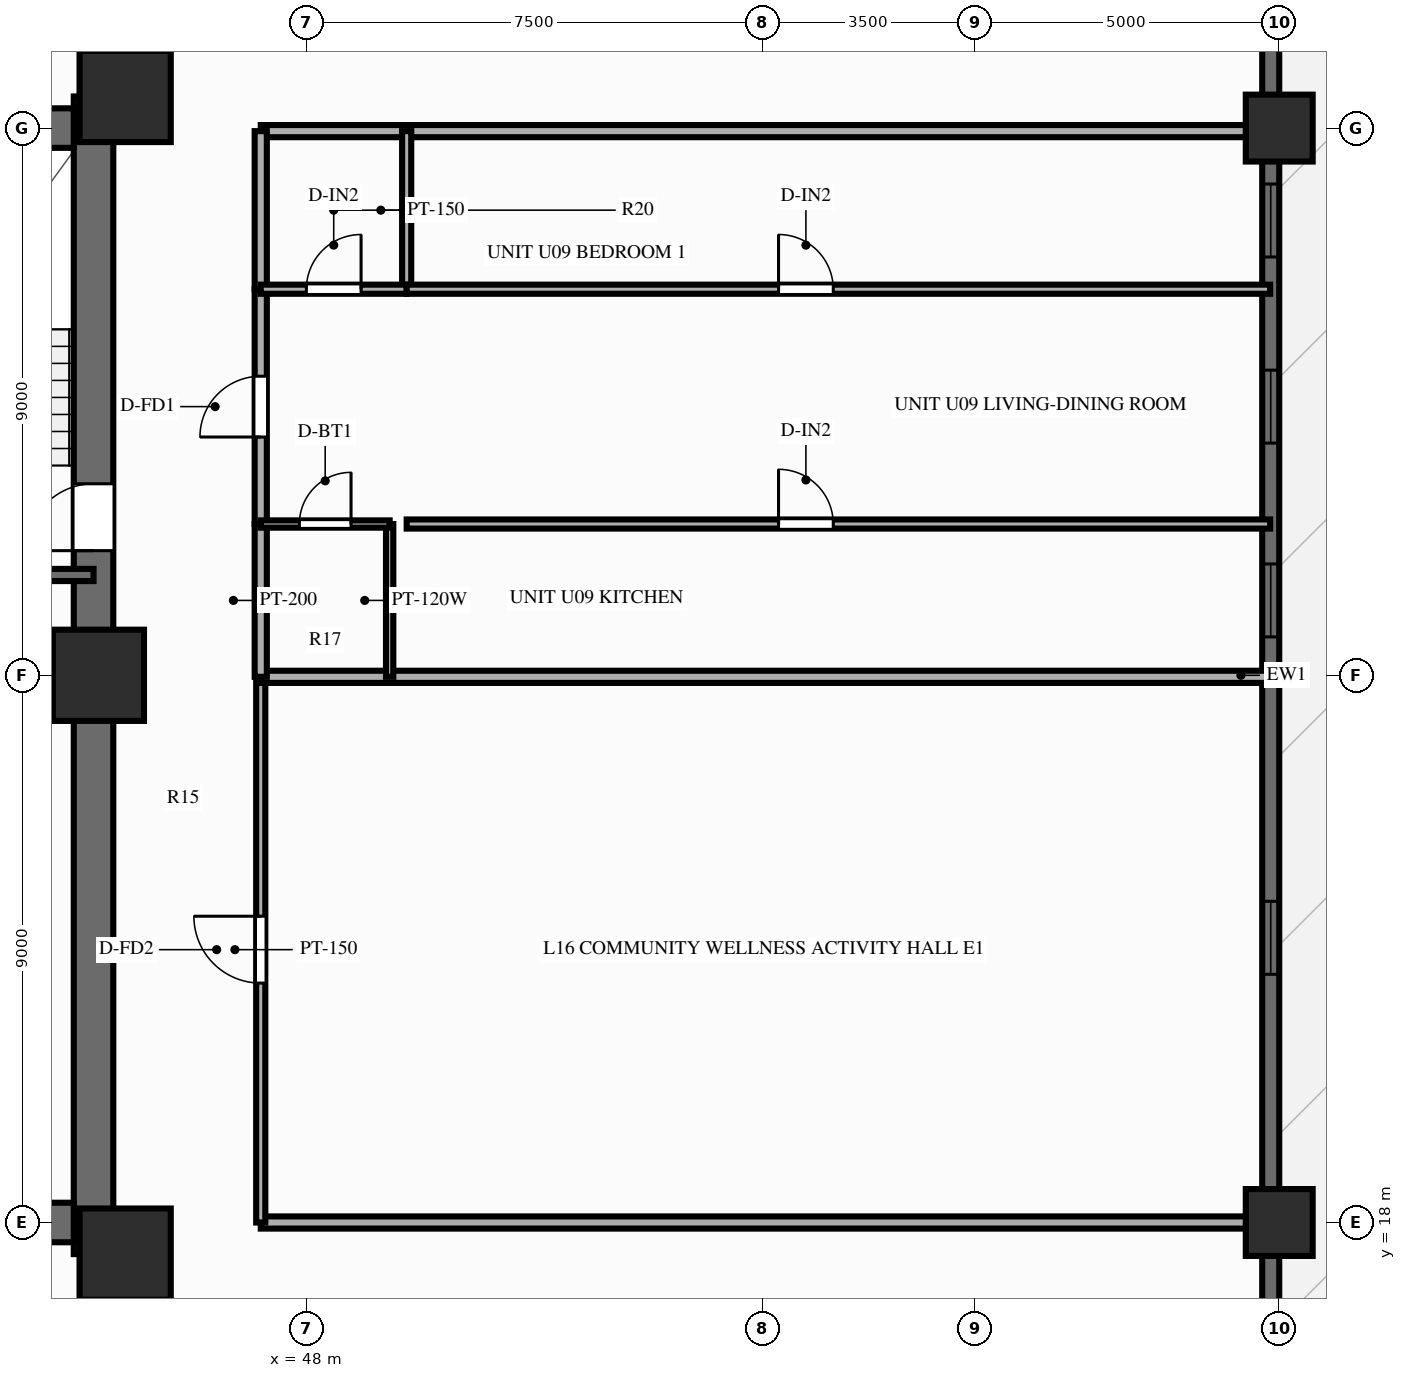
"""IFC4 building model, lengths in metres.
Left out: names, types, materials, properties, quantities, classifications, styles, units other than length and angle.
Written with IfcOpenShell. Run it as: python <this file> out.ifc"""

import sys

from ifc_helpers import new_model, si_unit, direction, frame, frame_2d, origin, origin_2d, place, context, subcontext, project, spatial, rectangle, extrude, source, transform, mapped, element, fill, save


model = new_model("IFC4")
c1 = context("Model", 3, precision=1e-05, world=origin(), true_north=direction((0.0, 1.0)))
c2 = subcontext(c1, "Body", "Model", "MODEL_VIEW")
j1 = project(units=[si_unit("LENGTHUNIT", "METRE"), si_unit("PLANEANGLEUNIT", "RADIAN")], contexts=[c1])
p1 = place(None, origin())
s1 = spatial("IfcSite", under=j1, at=p1, CompositionType="ELEMENT")
p2 = place(p1, origin())
s2 = spatial("IfcBuilding", under=s1, at=p2, CompositionType="ELEMENT")
p3 = place(p2, frame((0.0, 0.0, 52.4)))
s3 = spatial("IfcBuildingStorey", under=s2, at=p3, CompositionType="ELEMENT", Elevation=52.4)
p4 = place(p3, frame((44.5, 17.48, 0.0), z_axis=(0.0, 0.0, 1.0), x_axis=(0.0, 1.0, 0.0)))
e1 = element("IfcWall", 1, at=p4, inside=s3, PredefinedType="SHEAR", context=c2, shape_type="SweptSolid", body=[
    extrude(rectangle(XDim=19.04, YDim=0.65, at=frame_2d((9.52, 0.0))), origin(), (0.0, 0.0, 1.0), 3.0),
])
p5 = place(p4, frame((12.67, 0.0, 0.0), z_axis=(0.0, 0.0, 1.0), x_axis=(-1.0, 0.0, 0.0)))
e2 = element("IfcOpeningElement", 2, at=p5, cuts=e1, PredefinedType="OPENING", context=c2, shape_type="SweptSolid", body=[
    extrude(rectangle(XDim=1.1, YDim=2.15, at=frame_2d((0.55, 1.075))), frame((0.0, 0.337, 0.0), z_axis=(0.0, -1.0, 0.0), x_axis=(1.0, 0.0, 0.0)), (0.0, 0.0, 1.0), 0.674),
])
p6 = place(p3, frame((31.825, 18.0, 0.0), z_axis=(0.0, 0.0, 1.0), x_axis=(1.0, 0.0, 0.0)))
e3 = element("IfcWall", 3, at=p6, inside=s3, PredefinedType="SHEAR", context=c2, shape_type="SweptSolid", body=[
    extrude(rectangle(XDim=12.35, YDim=0.65, at=frame_2d((6.175, 0.0))), origin(), (0.0, 0.0, 1.0), 3.0),
])
p7 = place(p3, frame((31.825, 36.0, 0.0), z_axis=(0.0, 0.0, 1.0), x_axis=(1.0, 0.0, 0.0)))
e4 = element("IfcWall", 4, at=p7, inside=s3, PredefinedType="SHEAR", context=c2, shape_type="SweptSolid", body=[
    extrude(rectangle(XDim=12.35, YDim=0.65, at=frame_2d((6.175, 0.0))), origin(), (0.0, 0.0, 1.0), 3.0),
])
p8 = place(p7, frame((5.125, 0.0, 0.0), z_axis=(0.0, 0.0, 1.0), x_axis=(-1.0, 0.0, 0.0)))
e5 = element("IfcOpeningElement", 5, at=p8, cuts=e4, PredefinedType="OPENING", context=c2, shape_type="SweptSolid", body=[
    extrude(rectangle(XDim=1.4, YDim=2.15, at=frame_2d((0.7, 1.075))), frame((0.0, 0.337, 0.0), z_axis=(0.0, -1.0, 0.0), x_axis=(1.0, 0.0, 0.0)), (0.0, 0.0, 1.0), 0.674),
])
m1 = source(origin(), c2, "Body", "SweptSolid", [
    extrude(rectangle(XDim=1.5, YDim=1.5, at=origin_2d()), origin(), (0.0, 0.0, 1.0), 3.0),
])
for number, where, z_axis, x_axis in (
    (6, (45.02, 17.48, 0.0), (0.0, 0.0, 1.0), (1.0, 0.0, 0.0)),
    (7, (45.02, 36.52, 0.0), (0.0, 0.0, 1.0), (1.0, 0.0, 0.0)),
    (8, (44.58, 27.0, 0.0), (0.0, 0.0, 1.0), (1.0, 0.0, 0.0)),
):
    element("IfcColumn", number, at=place(p3, frame(where, z_axis=z_axis, x_axis=x_axis)), inside=s3, PredefinedType="COLUMN", context=c2, shape_type="MappedRepresentation", body=[
        mapped(m1, transform((0.0, 0.0, 0.0), scale=1.0)),
    ])
m2 = source(origin(), c2, "Body", "SweptSolid", [
    extrude(rectangle(XDim=1.1, YDim=1.1, at=origin_2d()), origin(), (0.0, 0.0, 1.0), 3.0),
])
for number, where, z_axis, x_axis in (
    (9, (64.0, 18.0, 0.0), (0.0, 0.0, 1.0), (1.0, 0.0, 0.0)),
    (10, (64.0, 36.0, 0.0), (0.0, 0.0, 1.0), (1.0, 0.0, 0.0)),
):
    element("IfcColumn", number, at=place(p3, frame(where, z_axis=z_axis, x_axis=x_axis)), inside=s3, PredefinedType="COLUMN", context=c2, shape_type="MappedRepresentation", body=[
        mapped(m2, transform((0.0, 0.0, 0.0), scale=1.0)),
    ])
p9 = place(p3, frame((63.86, 6.5, 0.0), z_axis=(0.0, 0.0, 1.0), x_axis=(0.0, 1.0, 0.0)))
e11 = element("IfcWall", 11, at=p9, inside=s3, PredefinedType="SOLIDWALL", context=c2, shape_type="SweptSolid", body=[
    extrude(rectangle(XDim=41.0, YDim=0.28, at=frame_2d((20.5, 0.0))), origin(), (0.0, 0.0, 1.0), 2.28),
])
p10 = place(p9, frame((5.15, 0.0, 0.25)))
e12 = element("IfcOpeningElement", 12, at=p10, cuts=e11, PredefinedType="OPENING", context=c2, shape_type="SweptSolid", body=[
    extrude(rectangle(XDim=1.2, YDim=1.5, at=frame_2d((0.6, 0.75))), frame((0.0, 0.152, 0.0), z_axis=(0.0, -1.0, 0.0), x_axis=(1.0, 0.0, 0.0)), (0.0, 0.0, 1.0), 0.304),
])
p11 = place(p9, frame((15.583, 0.0, 0.25)))
e13 = element("IfcOpeningElement", 13, at=p11, cuts=e11, PredefinedType="OPENING", context=c2, shape_type="SweptSolid", body=[
    extrude(rectangle(XDim=1.2, YDim=1.5, at=frame_2d((0.6, 0.75))), frame((0.0, 0.152, 0.0), z_axis=(0.0, -1.0, 0.0), x_axis=(1.0, 0.0, 0.0)), (0.0, 0.0, 1.0), 0.304),
])
p12 = place(p9, frame((21.132, 0.0, 0.25)))
e14 = element("IfcOpeningElement", 14, at=p12, cuts=e11, PredefinedType="OPENING", context=c2, shape_type="SweptSolid", body=[
    extrude(rectangle(XDim=1.2, YDim=1.5, at=frame_2d((0.6, 0.75))), frame((0.0, 0.152, 0.0), z_axis=(0.0, -1.0, 0.0), x_axis=(1.0, 0.0, 0.0)), (0.0, 0.0, 1.0), 0.304),
])
p13 = place(p9, frame((24.319, 0.0, 0.25)))
e15 = element("IfcOpeningElement", 15, at=p13, cuts=e11, PredefinedType="OPENING", context=c2, shape_type="SweptSolid", body=[
    extrude(rectangle(XDim=1.2, YDim=1.5, at=frame_2d((0.6, 0.75))), frame((0.0, 0.152, 0.0), z_axis=(0.0, -1.0, 0.0), x_axis=(1.0, 0.0, 0.0)), (0.0, 0.0, 1.0), 0.304),
])
p14 = place(p9, frame((27.38, 0.0, 0.25)))
e16 = element("IfcOpeningElement", 16, at=p14, cuts=e11, PredefinedType="OPENING", context=c2, shape_type="SweptSolid", body=[
    extrude(rectangle(XDim=1.2, YDim=1.5, at=frame_2d((0.6, 0.75))), frame((0.0, 0.152, 0.0), z_axis=(0.0, -1.0, 0.0), x_axis=(1.0, 0.0, 0.0)), (0.0, 0.0, 1.0), 0.304),
])
p15 = place(p9, frame((36.05, 0.0, 0.0), z_axis=(0.0, 0.0, 1.0), x_axis=(-1.0, 0.0, 0.0)))
e17 = element("IfcOpeningElement", 17, at=p15, cuts=e11, PredefinedType="OPENING", context=c2, shape_type="SweptSolid", body=[
    extrude(rectangle(XDim=1.6, YDim=2.15, at=frame_2d((0.8, 1.075))), frame((0.0, 0.152, 0.0), z_axis=(0.0, -1.0, 0.0), x_axis=(1.0, 0.0, 0.0)), (0.0, 0.0, 1.0), 0.304),
])
p16 = place(p3, frame((40.57, 28.65, 0.0), z_axis=(0.0, 0.0, 1.0), x_axis=(1.0, 0.0, 0.0)))
e18 = element("IfcWall", 18, at=p16, inside=s3, PredefinedType="SOLIDWALL", context=c2, shape_type="SweptSolid", body=[
    extrude(rectangle(XDim=3.93, YDim=0.2, at=frame_2d((1.965, 0.0))), origin(), (0.0, 0.0, 1.0), 2.79),
])
for number, where, z_axis, x_axis in (
    (19, (47.25, 18.0, 0.0), (0.0, 0.0, 1.0), (1.0, 0.0, 0.0)),
    (20, (47.25, 35.95, 0.0), (0.0, 0.0, 1.0), (1.0, 0.0, 0.0)),
):
    element("IfcWall", number, at=place(p3, frame(where, z_axis=z_axis, x_axis=x_axis)), inside=s3, PredefinedType="PARTITIONING", context=c2, shape_type="SweptSolid", body=[
        extrude(rectangle(XDim=16.6, YDim=0.2, at=frame_2d((8.3, 0.0))), origin(), (0.0, 0.0, 1.0), 2.24),
    ])
p17 = place(p3, frame((47.25, 18.0, 0.0), z_axis=(0.0, 0.0, 1.0), x_axis=(0.0, 1.0, 0.0)))
e21 = element("IfcWall", 21, at=p17, inside=s3, PredefinedType="PARTITIONING", context=c2, shape_type="SweptSolid", body=[
    extrude(rectangle(XDim=8.975, YDim=0.15, at=frame_2d((4.488, 0.0))), origin(), (0.0, 0.0, 1.0), 2.79),
])
p18 = place(p17, frame((3.938, 0.0, 0.0)))
e22 = element("IfcOpeningElement", 22, at=p18, cuts=e21, PredefinedType="OPENING", context=c2, shape_type="SweptSolid", body=[
    extrude(rectangle(XDim=1.1, YDim=2.15, at=frame_2d((0.55, 1.075))), frame((0.0, 0.087, 0.0), z_axis=(0.0, -1.0, 0.0), x_axis=(1.0, 0.0, 0.0)), (0.0, 0.0, 1.0), 0.174),
])
p19 = place(p3, frame((47.25, 26.975, 0.0), z_axis=(0.0, 0.0, 1.0), x_axis=(1.0, 0.0, 0.0)))
e23 = element("IfcWall", 23, at=p19, inside=s3, PredefinedType="PARTITIONING", context=c2, shape_type="SweptSolid", body=[
    extrude(rectangle(XDim=16.6, YDim=0.2, at=frame_2d((8.3, 0.0))), origin(), (0.0, 0.0, 1.0), 2.79),
])
p20 = place(p3, frame((47.25, 26.975, 0.0), z_axis=(0.0, 0.0, 1.0), x_axis=(0.0, 1.0, 0.0)))
e24 = element("IfcWall", 24, at=p20, inside=s3, PredefinedType="PARTITIONING", context=c2, shape_type="SweptSolid", body=[
    extrude(rectangle(XDim=2.513, YDim=0.2, at=frame_2d((1.256, 0.0))), origin(), (0.0, 0.0, 1.0), 2.79),
])
p21 = place(p3, frame((47.25, 29.488, 0.0), z_axis=(0.0, 0.0, 1.0), x_axis=(0.0, 1.0, 0.0)))
e25 = element("IfcWall", 25, at=p21, inside=s3, PredefinedType="PARTITIONING", context=c2, shape_type="SweptSolid", body=[
    extrude(rectangle(XDim=3.862, YDim=0.2, at=frame_2d((1.931, 0.0))), origin(), (0.0, 0.0, 1.0), 2.79),
])
p22 = place(p21, frame((1.431, 0.0, 0.0)))
e26 = element("IfcOpeningElement", 26, at=p22, cuts=e25, PredefinedType="OPENING", context=c2, shape_type="SweptSolid", body=[
    extrude(rectangle(XDim=1.0, YDim=2.15, at=frame_2d((0.5, 1.075))), frame((0.0, 0.112, 0.0), z_axis=(0.0, -1.0, 0.0), x_axis=(1.0, 0.0, 0.0)), (0.0, 0.0, 1.0), 0.224),
])
p23 = place(p3, frame((47.25, 33.35, 0.0), z_axis=(0.0, 0.0, 1.0), x_axis=(0.0, 1.0, 0.0)))
e27 = element("IfcWall", 27, at=p23, inside=s3, PredefinedType="PARTITIONING", context=c2, shape_type="SweptSolid", body=[
    extrude(rectangle(XDim=2.6, YDim=0.2, at=frame_2d((1.3, 0.0))), origin(), (0.0, 0.0, 1.0), 2.79),
])
p24 = place(p3, frame((49.37, 26.975, 0.0), z_axis=(0.0, 0.0, 1.0), x_axis=(0.0, 1.0, 0.0)))
e28 = element("IfcWall", 28, at=p24, inside=s3, PredefinedType="PARTITIONING", context=c2, shape_type="SweptSolid", body=[
    extrude(rectangle(XDim=2.513, YDim=0.12, at=frame_2d((1.256, 0.0))), origin(), (0.0, 0.0, 1.0), 2.79),
])
p25 = place(p3, frame((49.65, 33.35, 0.0), z_axis=(0.0, 0.0, 1.0), x_axis=(0.0, 1.0, 0.0)))
e29 = element("IfcWall", 29, at=p25, inside=s3, PredefinedType="PARTITIONING", context=c2, shape_type="SweptSolid", body=[
    extrude(rectangle(XDim=2.6, YDim=0.15, at=frame_2d((1.3, 0.0))), origin(), (0.0, 0.0, 1.0), 2.79),
])
p26 = place(p3, frame((47.25, 29.488, 0.0), z_axis=(0.0, 0.0, 1.0), x_axis=(1.0, 0.0, 0.0)))
e30 = element("IfcWall", 30, at=p26, inside=s3, PredefinedType="PARTITIONING", context=c2, shape_type="SweptSolid", body=[
    extrude(rectangle(XDim=2.12, YDim=0.12, at=frame_2d((1.06, 0.0))), origin(), (0.0, 0.0, 1.0), 2.79),
])
p27 = place(p26, frame((0.635, 0.0, 0.0)))
e31 = element("IfcOpeningElement", 31, at=p27, cuts=e30, PredefinedType="OPENING", context=c2, shape_type="SweptSolid", body=[
    extrude(rectangle(XDim=0.85, YDim=2.05, at=frame_2d((0.425, 1.025))), frame((0.0, 0.072, 0.0), z_axis=(0.0, -1.0, 0.0), x_axis=(1.0, 0.0, 0.0)), (0.0, 0.0, 1.0), 0.144),
])
p28 = place(p3, frame((49.65, 29.488, 0.0), z_axis=(0.0, 0.0, 1.0), x_axis=(1.0, 0.0, 0.0)))
e32 = element("IfcWall", 32, at=p28, inside=s3, PredefinedType="PARTITIONING", context=c2, shape_type="SweptSolid", body=[
    extrude(rectangle(XDim=14.2, YDim=0.15, at=frame_2d((7.1, 0.0))), origin(), (0.0, 0.0, 1.0), 2.79),
])
p29 = place(p28, frame((6.116, 0.0, 0.0)))
e33 = element("IfcOpeningElement", 33, at=p29, cuts=e32, PredefinedType="OPENING", context=c2, shape_type="SweptSolid", body=[
    extrude(rectangle(XDim=0.9, YDim=2.1, at=frame_2d((0.45, 1.05))), frame((0.0, 0.087, 0.0), z_axis=(0.0, -1.0, 0.0), x_axis=(1.0, 0.0, 0.0)), (0.0, 0.0, 1.0), 0.174),
])
p30 = place(p3, frame((47.25, 33.35, 0.0), z_axis=(0.0, 0.0, 1.0), x_axis=(1.0, 0.0, 0.0)))
e34 = element("IfcWall", 34, at=p30, inside=s3, PredefinedType="PARTITIONING", context=c2, shape_type="SweptSolid", body=[
    extrude(rectangle(XDim=2.4, YDim=0.15, at=frame_2d((1.2, 0.0))), origin(), (0.0, 0.0, 1.0), 2.79),
])
p31 = place(p30, frame((0.75, 0.0, 0.0)))
e35 = element("IfcOpeningElement", 35, at=p31, cuts=e34, PredefinedType="OPENING", context=c2, shape_type="SweptSolid", body=[
    extrude(rectangle(XDim=0.9, YDim=2.1, at=frame_2d((0.45, 1.05))), frame((0.0, 0.087, 0.0), z_axis=(0.0, -1.0, 0.0), x_axis=(1.0, 0.0, 0.0)), (0.0, 0.0, 1.0), 0.174),
])
p32 = place(p3, frame((49.65, 33.35, 0.0), z_axis=(0.0, 0.0, 1.0), x_axis=(1.0, 0.0, 0.0)))
e36 = element("IfcWall", 36, at=p32, inside=s3, PredefinedType="PARTITIONING", context=c2, shape_type="SweptSolid", body=[
    extrude(rectangle(XDim=14.2, YDim=0.15, at=frame_2d((7.1, 0.0))), origin(), (0.0, 0.0, 1.0), 2.79),
])
p33 = place(p32, frame((6.116, 0.0, 0.0)))
e37 = element("IfcOpeningElement", 37, at=p33, cuts=e36, PredefinedType="OPENING", context=c2, shape_type="SweptSolid", body=[
    extrude(rectangle(XDim=0.9, YDim=2.1, at=frame_2d((0.45, 1.05))), frame((0.0, 0.087, 0.0), z_axis=(0.0, -1.0, 0.0), x_axis=(1.0, 0.0, 0.0)), (0.0, 0.0, 1.0), 0.174),
])
m3 = source(origin(), c2, "Body", "SweptSolid", [
    extrude(rectangle(XDim=1.2, YDim=1.5, at=frame_2d((0.6, 0.75))), frame((0.0, 0.03, 0.0), z_axis=(0.0, -1.0, 0.0), x_axis=(1.0, 0.0, 0.0)), (0.0, 0.0, 1.0), 0.06),
])
p34 = place(p11, origin())
e38 = element("IfcWindow", 38, at=p34, inside=s3, PartitioningType="SINGLE_PANEL", PredefinedType="WINDOW", context=c2, shape_type="MappedRepresentation", body=[
    mapped(m3, transform((0.0, 0.0, 0.0), scale=1.0)),
])
fill(e13, e38)
p35 = place(p12, origin())
e39 = element("IfcWindow", 39, at=p35, inside=s3, PartitioningType="SINGLE_PANEL", PredefinedType="WINDOW", context=c2, shape_type="MappedRepresentation", body=[
    mapped(m3, transform((0.0, 0.0, 0.0), scale=1.0)),
])
fill(e14, e39)
p36 = place(p13, origin())
e40 = element("IfcWindow", 40, at=p36, inside=s3, PartitioningType="SINGLE_PANEL", PredefinedType="WINDOW", context=c2, shape_type="MappedRepresentation", body=[
    mapped(m3, transform((0.0, 0.0, 0.0), scale=1.0)),
])
fill(e15, e40)
p37 = place(p14, origin())
e41 = element("IfcWindow", 41, at=p37, inside=s3, PartitioningType="SINGLE_PANEL", PredefinedType="WINDOW", context=c2, shape_type="MappedRepresentation", body=[
    mapped(m3, transform((0.0, 0.0, 0.0), scale=1.0)),
])
fill(e16, e41)
m4 = source(origin(), c2, "Body", "SweptSolid", [
    extrude(rectangle(XDim=1.1, YDim=2.15, at=frame_2d((0.55, 1.075))), frame((0.0, 0.025, 0.0), z_axis=(0.0, -1.0, 0.0), x_axis=(1.0, 0.0, 0.0)), (0.0, 0.0, 1.0), 0.05),
])
p38 = place(p5, origin())
e42 = element("IfcDoor", 42, at=p38, inside=s3, OperationType="SINGLE_SWING_RIGHT", PredefinedType="DOOR", context=c2, shape_type="MappedRepresentation", body=[
    mapped(m4, transform((0.0, 0.0, 0.0), scale=1.0)),
])
fill(e2, e42)
p39 = place(p18, origin())
e43 = element("IfcDoor", 43, at=p39, inside=s3, OperationType="SINGLE_SWING_RIGHT", PredefinedType="DOOR", context=c2, shape_type="MappedRepresentation", body=[
    mapped(m4, transform((0.0, 0.0, 0.0), scale=1.0)),
])
fill(e22, e43)
m5 = source(origin(), c2, "Body", "SweptSolid", [
    extrude(rectangle(XDim=1.0, YDim=2.15, at=frame_2d((0.5, 1.075))), frame((0.0, 0.025, 0.0), z_axis=(0.0, -1.0, 0.0), x_axis=(1.0, 0.0, 0.0)), (0.0, 0.0, 1.0), 0.05),
])
p40 = place(p22, origin())
e44 = element("IfcDoor", 44, at=p40, inside=s3, OperationType="SINGLE_SWING_LEFT", PredefinedType="DOOR", context=c2, shape_type="MappedRepresentation", body=[
    mapped(m5, transform((0.0, 0.0, 0.0), scale=1.0)),
])
fill(e26, e44)
m6 = source(origin(), c2, "Body", "SweptSolid", [
    extrude(rectangle(XDim=0.85, YDim=2.05, at=frame_2d((0.425, 1.025))), frame((0.0, 0.025, 0.0), z_axis=(0.0, -1.0, 0.0), x_axis=(1.0, 0.0, 0.0)), (0.0, 0.0, 1.0), 0.05),
])
p41 = place(p27, origin())
e45 = element("IfcDoor", 45, at=p41, inside=s3, OperationType="SINGLE_SWING_RIGHT", PredefinedType="DOOR", context=c2, shape_type="MappedRepresentation", body=[
    mapped(m6, transform((0.0, 0.0, 0.0), scale=1.0)),
])
fill(e31, e45)
m7 = source(origin(), c2, "Body", "SweptSolid", [
    extrude(rectangle(XDim=0.9, YDim=2.1, at=frame_2d((0.45, 1.05))), frame((0.0, 0.025, 0.0), z_axis=(0.0, -1.0, 0.0), x_axis=(1.0, 0.0, 0.0)), (0.0, 0.0, 1.0), 0.05),
])
p42 = place(p29, origin())
e46 = element("IfcDoor", 46, at=p42, inside=s3, OperationType="SINGLE_SWING_LEFT", PredefinedType="DOOR", context=c2, shape_type="MappedRepresentation", body=[
    mapped(m7, transform((0.0, 0.0, 0.0), scale=1.0)),
])
fill(e33, e46)
p43 = place(p31, origin())
e47 = element("IfcDoor", 47, at=p43, inside=s3, OperationType="SINGLE_SWING_RIGHT", PredefinedType="DOOR", context=c2, shape_type="MappedRepresentation", body=[
    mapped(m7, transform((0.0, 0.0, 0.0), scale=1.0)),
])
fill(e35, e47)
p44 = place(p33, origin())
e48 = element("IfcDoor", 48, at=p44, inside=s3, OperationType="SINGLE_SWING_LEFT", PredefinedType="DOOR", context=c2, shape_type="MappedRepresentation", body=[
    mapped(m7, transform((0.0, 0.0, 0.0), scale=1.0)),
])
fill(e37, e48)
save(model, sys.argv[1])
